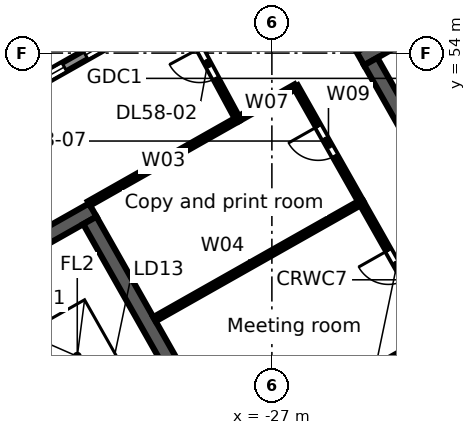
"""IFC4 building model, lengths in metres.
Left out: names, types, materials, properties, quantities, classifications, styles, units other than length and angle.
Written with IfcOpenShell. Run it as: python <this file> out.ifc"""

import sys

from ifc_helpers import new_model, si_unit, direction, frame, frame_2d, origin, place, context, subcontext, project, spatial, rectangle, extrude, element, fill, save


model = new_model("IFC4")
c1 = context("Model", 3, precision=1e-05, world=origin(), true_north=direction((0.0, 1.0)))
c2 = subcontext(c1, "Body", "Model", "MODEL_VIEW")
j1 = project(units=[si_unit("LENGTHUNIT", "METRE"), si_unit("PLANEANGLEUNIT", "RADIAN")], contexts=[c1])
p1 = place(None, origin())
s1 = spatial("IfcSite", under=j1, at=p1, CompositionType="ELEMENT")
p2 = place(p1, origin())
s2 = spatial("IfcBuilding", under=s1, at=p2, CompositionType="ELEMENT")
p3 = place(p2, frame((0.0, 0.0, 262.7)))
s3 = spatial("IfcBuildingStorey", under=s2, at=p3, CompositionType="ELEMENT", Elevation=262.7)
p4 = place(p3, frame((-58.732, 38.771, 0.0), z_axis=(0.0, 0.0, 1.0), x_axis=(0.870355615581, 0.492423702137, 0.0)))
e1 = element("IfcWall", 1, at=p4, inside=s3, PredefinedType="STANDARD", context=c2, shape_type="SweptSolid", body=[
    extrude(rectangle(XDim=64.052, YDim=0.25, at=frame_2d((32.026, 0.0))), origin(), (0.0, 0.0, 1.0), 3.52),
])
p5 = place(p4, frame((61.259, 0.0, 0.8)))
e2 = element("IfcOpeningElement", 2, at=p5, cuts=e1, PredefinedType="OPENING", context=c2, shape_type="SweptSolid", body=[
    extrude(rectangle(XDim=2.4, YDim=2.2, at=frame_2d((1.2, 1.1))), frame((0.0, 0.135, 0.0), z_axis=(0.0, -1.0, 0.0), x_axis=(1.0, 0.0, 0.0)), (0.0, 0.0, 1.0), 0.27),
])
p6 = place(p4, frame((58.216, 0.0, 0.8)))
e3 = element("IfcOpeningElement", 3, at=p6, cuts=e1, PredefinedType="OPENING", context=c2, shape_type="SweptSolid", body=[
    extrude(rectangle(XDim=2.4, YDim=2.2, at=frame_2d((1.2, 1.1))), frame((0.0, 0.135, 0.0), z_axis=(0.0, -1.0, 0.0), x_axis=(1.0, 0.0, 0.0)), (0.0, 0.0, 1.0), 0.27),
])
p7 = place(p4, frame((55.173, 0.0, 0.8)))
e4 = element("IfcOpeningElement", 4, at=p7, cuts=e1, PredefinedType="OPENING", context=c2, shape_type="SweptSolid", body=[
    extrude(rectangle(XDim=2.4, YDim=2.2, at=frame_2d((1.2, 1.1))), frame((0.0, 0.135, 0.0), z_axis=(0.0, -1.0, 0.0), x_axis=(1.0, 0.0, 0.0)), (0.0, 0.0, 1.0), 0.27),
])
p8 = place(p4, frame((52.129, 0.0, 0.8)))
e5 = element("IfcOpeningElement", 5, at=p8, cuts=e1, PredefinedType="OPENING", context=c2, shape_type="SweptSolid", body=[
    extrude(rectangle(XDim=2.4, YDim=2.2, at=frame_2d((1.2, 1.1))), frame((0.0, 0.135, 0.0), z_axis=(0.0, -1.0, 0.0), x_axis=(1.0, 0.0, 0.0)), (0.0, 0.0, 1.0), 0.27),
])
p9 = place(p4, frame((49.086, 0.0, 0.8)))
e6 = element("IfcOpeningElement", 6, at=p9, cuts=e1, PredefinedType="OPENING", context=c2, shape_type="SweptSolid", body=[
    extrude(rectangle(XDim=2.4, YDim=2.2, at=frame_2d((1.2, 1.1))), frame((0.0, 0.135, 0.0), z_axis=(0.0, -1.0, 0.0), x_axis=(1.0, 0.0, 0.0)), (0.0, 0.0, 1.0), 0.27),
])
p10 = place(p4, frame((46.043, 0.0, 0.8)))
e7 = element("IfcOpeningElement", 7, at=p10, cuts=e1, PredefinedType="OPENING", context=c2, shape_type="SweptSolid", body=[
    extrude(rectangle(XDim=2.4, YDim=2.2, at=frame_2d((1.2, 1.1))), frame((0.0, 0.135, 0.0), z_axis=(0.0, -1.0, 0.0), x_axis=(1.0, 0.0, 0.0)), (0.0, 0.0, 1.0), 0.27),
])
p11 = place(p4, frame((43.0, 0.0, 0.8)))
e8 = element("IfcOpeningElement", 8, at=p11, cuts=e1, PredefinedType="OPENING", context=c2, shape_type="SweptSolid", body=[
    extrude(rectangle(XDim=2.4, YDim=2.2, at=frame_2d((1.2, 1.1))), frame((0.0, 0.135, 0.0), z_axis=(0.0, -1.0, 0.0), x_axis=(1.0, 0.0, 0.0)), (0.0, 0.0, 1.0), 0.27),
])
p12 = place(p4, frame((39.956, 0.0, 0.8)))
e9 = element("IfcOpeningElement", 9, at=p12, cuts=e1, PredefinedType="OPENING", context=c2, shape_type="SweptSolid", body=[
    extrude(rectangle(XDim=2.4, YDim=2.2, at=frame_2d((1.2, 1.1))), frame((0.0, 0.135, 0.0), z_axis=(0.0, -1.0, 0.0), x_axis=(1.0, 0.0, 0.0)), (0.0, 0.0, 1.0), 0.27),
])
p13 = place(p4, frame((36.913, 0.0, 0.8)))
e10 = element("IfcOpeningElement", 10, at=p13, cuts=e1, PredefinedType="OPENING", context=c2, shape_type="SweptSolid", body=[
    extrude(rectangle(XDim=2.4, YDim=2.2, at=frame_2d((1.2, 1.1))), frame((0.0, 0.135, 0.0), z_axis=(0.0, -1.0, 0.0), x_axis=(1.0, 0.0, 0.0)), (0.0, 0.0, 1.0), 0.27),
])
p14 = place(p4, frame((33.87, 0.0, 0.8)))
e11 = element("IfcOpeningElement", 11, at=p14, cuts=e1, PredefinedType="OPENING", context=c2, shape_type="SweptSolid", body=[
    extrude(rectangle(XDim=2.4, YDim=2.2, at=frame_2d((1.2, 1.1))), frame((0.0, 0.135, 0.0), z_axis=(0.0, -1.0, 0.0), x_axis=(1.0, 0.0, 0.0)), (0.0, 0.0, 1.0), 0.27),
])
p15 = place(p4, frame((30.826, 0.0, 0.8)))
e12 = element("IfcOpeningElement", 12, at=p15, cuts=e1, PredefinedType="OPENING", context=c2, shape_type="SweptSolid", body=[
    extrude(rectangle(XDim=2.4, YDim=2.2, at=frame_2d((1.2, 1.1))), frame((0.0, 0.135, 0.0), z_axis=(0.0, -1.0, 0.0), x_axis=(1.0, 0.0, 0.0)), (0.0, 0.0, 1.0), 0.27),
])
p16 = place(p4, frame((27.783, 0.0, 0.8)))
e13 = element("IfcOpeningElement", 13, at=p16, cuts=e1, PredefinedType="OPENING", context=c2, shape_type="SweptSolid", body=[
    extrude(rectangle(XDim=2.4, YDim=2.2, at=frame_2d((1.2, 1.1))), frame((0.0, 0.135, 0.0), z_axis=(0.0, -1.0, 0.0), x_axis=(1.0, 0.0, 0.0)), (0.0, 0.0, 1.0), 0.27),
])
p17 = place(p4, frame((24.74, 0.0, 0.8)))
e14 = element("IfcOpeningElement", 14, at=p17, cuts=e1, PredefinedType="OPENING", context=c2, shape_type="SweptSolid", body=[
    extrude(rectangle(XDim=2.4, YDim=2.2, at=frame_2d((1.2, 1.1))), frame((0.0, 0.135, 0.0), z_axis=(0.0, -1.0, 0.0), x_axis=(1.0, 0.0, 0.0)), (0.0, 0.0, 1.0), 0.27),
])
p18 = place(p4, frame((21.696, 0.0, 0.8)))
e15 = element("IfcOpeningElement", 15, at=p18, cuts=e1, PredefinedType="OPENING", context=c2, shape_type="SweptSolid", body=[
    extrude(rectangle(XDim=2.4, YDim=2.2, at=frame_2d((1.2, 1.1))), frame((0.0, 0.135, 0.0), z_axis=(0.0, -1.0, 0.0), x_axis=(1.0, 0.0, 0.0)), (0.0, 0.0, 1.0), 0.27),
])
p19 = place(p4, frame((18.653, 0.0, 0.8)))
e16 = element("IfcOpeningElement", 16, at=p19, cuts=e1, PredefinedType="OPENING", context=c2, shape_type="SweptSolid", body=[
    extrude(rectangle(XDim=2.4, YDim=2.2, at=frame_2d((1.2, 1.1))), frame((0.0, 0.135, 0.0), z_axis=(0.0, -1.0, 0.0), x_axis=(1.0, 0.0, 0.0)), (0.0, 0.0, 1.0), 0.27),
])
p20 = place(p4, frame((15.61, 0.0, 0.8)))
e17 = element("IfcOpeningElement", 17, at=p20, cuts=e1, PredefinedType="OPENING", context=c2, shape_type="SweptSolid", body=[
    extrude(rectangle(XDim=2.4, YDim=2.2, at=frame_2d((1.2, 1.1))), frame((0.0, 0.135, 0.0), z_axis=(0.0, -1.0, 0.0), x_axis=(1.0, 0.0, 0.0)), (0.0, 0.0, 1.0), 0.27),
])
p21 = place(p4, frame((12.567, 0.0, 0.8)))
e18 = element("IfcOpeningElement", 18, at=p21, cuts=e1, PredefinedType="OPENING", context=c2, shape_type="SweptSolid", body=[
    extrude(rectangle(XDim=2.4, YDim=2.2, at=frame_2d((1.2, 1.1))), frame((0.0, 0.135, 0.0), z_axis=(0.0, -1.0, 0.0), x_axis=(1.0, 0.0, 0.0)), (0.0, 0.0, 1.0), 0.27),
])
p22 = place(p4, frame((9.523, 0.0, 0.8)))
e19 = element("IfcOpeningElement", 19, at=p22, cuts=e1, PredefinedType="OPENING", context=c2, shape_type="SweptSolid", body=[
    extrude(rectangle(XDim=2.4, YDim=2.2, at=frame_2d((1.2, 1.1))), frame((0.0, 0.135, 0.0), z_axis=(0.0, -1.0, 0.0), x_axis=(1.0, 0.0, 0.0)), (0.0, 0.0, 1.0), 0.27),
])
p23 = place(p4, frame((6.48, 0.0, 0.8)))
e20 = element("IfcOpeningElement", 20, at=p23, cuts=e1, PredefinedType="OPENING", context=c2, shape_type="SweptSolid", body=[
    extrude(rectangle(XDim=2.4, YDim=2.2, at=frame_2d((1.2, 1.1))), frame((0.0, 0.135, 0.0), z_axis=(0.0, -1.0, 0.0), x_axis=(1.0, 0.0, 0.0)), (0.0, 0.0, 1.0), 0.27),
])
p24 = place(p4, frame((3.437, 0.0, 0.8)))
e21 = element("IfcOpeningElement", 21, at=p24, cuts=e1, PredefinedType="OPENING", context=c2, shape_type="SweptSolid", body=[
    extrude(rectangle(XDim=2.4, YDim=2.2, at=frame_2d((1.2, 1.1))), frame((0.0, 0.135, 0.0), z_axis=(0.0, -1.0, 0.0), x_axis=(1.0, 0.0, 0.0)), (0.0, 0.0, 1.0), 0.27),
])
p25 = place(p4, frame((0.393, 0.0, 0.8)))
e22 = element("IfcOpeningElement", 22, at=p25, cuts=e1, PredefinedType="OPENING", context=c2, shape_type="SweptSolid", body=[
    extrude(rectangle(XDim=2.4, YDim=2.2, at=frame_2d((1.2, 1.1))), frame((0.0, 0.135, 0.0), z_axis=(0.0, -1.0, 0.0), x_axis=(1.0, 0.0, 0.0)), (0.0, 0.0, 1.0), 0.27),
])
p26 = place(p3, frame((-3.017, 46.293, 0.0), z_axis=(0.0, 0.0, 1.0), x_axis=(-0.870355474887, -0.492423950812, 0.0)))
e23 = element("IfcWall", 23, at=p26, inside=s3, PredefinedType="STANDARD", context=c2, shape_type="SweptSolid", body=[
    extrude(rectangle(XDim=40.34, YDim=0.25, at=frame_2d((20.17, 0.0))), origin(), (0.0, 0.0, 1.0), 3.52),
])
p27 = place(p26, frame((37.428, 0.0, 0.8)))
e24 = element("IfcOpeningElement", 24, at=p27, cuts=e23, PredefinedType="OPENING", context=c2, shape_type="SweptSolid", body=[
    extrude(rectangle(XDim=2.4, YDim=2.2, at=frame_2d((1.2, 1.1))), frame((0.0, 0.135, 0.0), z_axis=(0.0, -1.0, 0.0), x_axis=(1.0, 0.0, 0.0)), (0.0, 0.0, 1.0), 0.27),
])
p28 = place(p26, frame((34.372, 0.0, 0.0)))
e25 = element("IfcOpeningElement", 25, at=p28, cuts=e23, PredefinedType="OPENING", context=c2, shape_type="SweptSolid", body=[
    extrude(rectangle(XDim=1.8, YDim=2.4, at=frame_2d((0.9, 1.2))), frame((0.0, 0.135, 0.0), z_axis=(0.0, -1.0, 0.0), x_axis=(1.0, 0.0, 0.0)), (0.0, 0.0, 1.0), 0.27),
])
p29 = place(p26, frame((30.716, 0.0, 0.8)))
e26 = element("IfcOpeningElement", 26, at=p29, cuts=e23, PredefinedType="OPENING", context=c2, shape_type="SweptSolid", body=[
    extrude(rectangle(XDim=2.4, YDim=2.2, at=frame_2d((1.2, 1.1))), frame((0.0, 0.135, 0.0), z_axis=(0.0, -1.0, 0.0), x_axis=(1.0, 0.0, 0.0)), (0.0, 0.0, 1.0), 0.27),
])
p30 = place(p26, frame((27.36, 0.0, 0.8)))
e27 = element("IfcOpeningElement", 27, at=p30, cuts=e23, PredefinedType="OPENING", context=c2, shape_type="SweptSolid", body=[
    extrude(rectangle(XDim=2.4, YDim=2.2, at=frame_2d((1.2, 1.1))), frame((0.0, 0.135, 0.0), z_axis=(0.0, -1.0, 0.0), x_axis=(1.0, 0.0, 0.0)), (0.0, 0.0, 1.0), 0.27),
])
p31 = place(p26, frame((24.304, 0.0, 0.0)))
e28 = element("IfcOpeningElement", 28, at=p31, cuts=e23, PredefinedType="OPENING", context=c2, shape_type="SweptSolid", body=[
    extrude(rectangle(XDim=1.8, YDim=2.4, at=frame_2d((0.9, 1.2))), frame((0.0, 0.135, 0.0), z_axis=(0.0, -1.0, 0.0), x_axis=(1.0, 0.0, 0.0)), (0.0, 0.0, 1.0), 0.27),
])
p32 = place(p26, frame((20.648, 0.0, 0.8)))
e29 = element("IfcOpeningElement", 29, at=p32, cuts=e23, PredefinedType="OPENING", context=c2, shape_type="SweptSolid", body=[
    extrude(rectangle(XDim=2.4, YDim=2.2, at=frame_2d((1.2, 1.1))), frame((0.0, 0.135, 0.0), z_axis=(0.0, -1.0, 0.0), x_axis=(1.0, 0.0, 0.0)), (0.0, 0.0, 1.0), 0.27),
])
p33 = place(p26, frame((17.292, 0.0, 0.8)))
e30 = element("IfcOpeningElement", 30, at=p33, cuts=e23, PredefinedType="OPENING", context=c2, shape_type="SweptSolid", body=[
    extrude(rectangle(XDim=2.4, YDim=2.2, at=frame_2d((1.2, 1.1))), frame((0.0, 0.135, 0.0), z_axis=(0.0, -1.0, 0.0), x_axis=(1.0, 0.0, 0.0)), (0.0, 0.0, 1.0), 0.27),
])
p34 = place(p26, frame((14.236, 0.0, 0.0)))
e31 = element("IfcOpeningElement", 31, at=p34, cuts=e23, PredefinedType="OPENING", context=c2, shape_type="SweptSolid", body=[
    extrude(rectangle(XDim=1.8, YDim=2.4, at=frame_2d((0.9, 1.2))), frame((0.0, 0.135, 0.0), z_axis=(0.0, -1.0, 0.0), x_axis=(1.0, 0.0, 0.0)), (0.0, 0.0, 1.0), 0.27),
])
p35 = place(p26, frame((10.58, 0.0, 0.8)))
e32 = element("IfcOpeningElement", 32, at=p35, cuts=e23, PredefinedType="OPENING", context=c2, shape_type="SweptSolid", body=[
    extrude(rectangle(XDim=2.4, YDim=2.2, at=frame_2d((1.2, 1.1))), frame((0.0, 0.135, 0.0), z_axis=(0.0, -1.0, 0.0), x_axis=(1.0, 0.0, 0.0)), (0.0, 0.0, 1.0), 0.27),
])
p36 = place(p26, frame((7.224, 0.0, 0.8)))
e33 = element("IfcOpeningElement", 33, at=p36, cuts=e23, PredefinedType="OPENING", context=c2, shape_type="SweptSolid", body=[
    extrude(rectangle(XDim=2.4, YDim=2.2, at=frame_2d((1.2, 1.1))), frame((0.0, 0.135, 0.0), z_axis=(0.0, -1.0, 0.0), x_axis=(1.0, 0.0, 0.0)), (0.0, 0.0, 1.0), 0.27),
])
p37 = place(p26, frame((4.168, 0.0, 0.0)))
e34 = element("IfcOpeningElement", 34, at=p37, cuts=e23, PredefinedType="OPENING", context=c2, shape_type="SweptSolid", body=[
    extrude(rectangle(XDim=1.8, YDim=2.4, at=frame_2d((0.9, 1.2))), frame((0.0, 0.135, 0.0), z_axis=(0.0, -1.0, 0.0), x_axis=(1.0, 0.0, 0.0)), (0.0, 0.0, 1.0), 0.27),
])
p38 = place(p26, frame((0.512, 0.0, 0.8)))
e35 = element("IfcOpeningElement", 35, at=p38, cuts=e23, PredefinedType="OPENING", context=c2, shape_type="SweptSolid", body=[
    extrude(rectangle(XDim=2.4, YDim=2.2, at=frame_2d((1.2, 1.1))), frame((0.0, 0.135, 0.0), z_axis=(0.0, -1.0, 0.0), x_axis=(1.0, 0.0, 0.0)), (0.0, 0.0, 1.0), 0.27),
])
p39 = place(p3, frame((-46.51, 41.499, 0.0), z_axis=(0.0, 0.0, 1.0), x_axis=(0.870356271124, 0.492422543467, 0.0)))
e36 = element("IfcWall", 36, at=p39, inside=s3, PredefinedType="SOLIDWALL", context=c2, shape_type="SweptSolid", body=[
    extrude(rectangle(XDim=17.0, YDim=0.4, at=frame_2d((8.5, 0.0))), origin(), (0.0, 0.0, 1.0), 3.52),
])
p40 = place(p3, frame((-31.79, 49.597, 0.0), z_axis=(0.0, 0.0, 1.0), x_axis=(0.492421663121, -0.870356769198, 0.0)))
e37 = element("IfcWall", 37, at=p40, inside=s3, PredefinedType="SOLIDWALL", context=c2, shape_type="SweptSolid", body=[
    extrude(rectangle(XDim=13.2, YDim=0.4, at=frame_2d((6.6, 0.0))), origin(), (0.0, 0.0, 1.0), 3.52),
])
p41 = place(p3, frame((-24.672, 53.854, 0.0), z_axis=(0.0, 0.0, 1.0), x_axis=(0.870353598469, 0.492427267353, 0.0)))
e38 = element("IfcWall", 38, at=p41, inside=s3, PredefinedType="SOLIDWALL", context=c2, shape_type="SweptSolid", body=[
    extrude(rectangle(XDim=15.0, YDim=0.4, at=frame_2d((7.5, 0.0))), origin(), (0.0, 0.0, 1.0), 3.52),
])
p42 = place(p3, frame((-24.4, 53.779, 0.0), z_axis=(0.0, 0.0, 1.0), x_axis=(0.492421663121, -0.870356769198, 0.0)))
e39 = element("IfcWall", 39, at=p42, inside=s3, PredefinedType="SOLIDWALL", context=c2, shape_type="SweptSolid", body=[
    extrude(rectangle(XDim=13.2, YDim=0.4, at=frame_2d((6.6, 0.0))), origin(), (0.0, 0.0, 1.0), 3.52),
])
p43 = place(p3, frame((-31.812, 50.044, 0.0), z_axis=(0.0, 0.0, 1.0), x_axis=(0.870309075431, 0.492505952474, 0.0)))
e40 = element("IfcWall", 40, at=p43, inside=s3, PredefinedType="PARTITIONING", context=c2, shape_type="SweptSolid", body=[
    extrude(rectangle(XDim=4.5, YDim=0.125, at=frame_2d((2.25, 0.0))), origin(), (0.0, 0.0, 1.0), 3.52),
])
p44 = place(p3, frame((-30.089, 46.998, 0.0), z_axis=(0.0, 0.0, 1.0), x_axis=(0.870424575418, 0.492301796167, 0.0)))
e41 = element("IfcWall", 41, at=p44, inside=s3, PredefinedType="PARTITIONING", context=c2, shape_type="SweptSolid", body=[
    extrude(rectangle(XDim=6.25, YDim=0.125, at=frame_2d((3.125, 0.0))), origin(), (0.0, 0.0, 1.0), 3.52),
])
p45 = place(p3, frame((-29.474, 55.181, 0.0), z_axis=(0.0, 0.0, 1.0), x_axis=(0.475344759365, -0.879799613403, 0.0)))
e42 = element("IfcWall", 42, at=p45, inside=s3, PredefinedType="PARTITIONING", context=c2, shape_type="SweptSolid", body=[
    extrude(rectangle(XDim=3.32, YDim=0.125, at=frame_2d((1.66, 0.0))), origin(), (0.0, 0.0, 1.0), 2.888),
])
p46 = place(p45, frame((1.2, 0.0, 0.0)))
e43 = element("IfcOpeningElement", 43, at=p46, cuts=e42, PredefinedType="OPENING", context=c2, shape_type="SweptSolid", body=[
    extrude(rectangle(XDim=0.9, YDim=2.1, at=frame_2d((0.45, 1.05))), frame((0.0, 0.073, 0.0), z_axis=(0.0, -1.0, 0.0), x_axis=(1.0, 0.0, 0.0)), (0.0, 0.0, 1.0), 0.145),
])
p47 = place(p3, frame((-28.119, 43.516, 0.0), z_axis=(0.0, 0.0, 1.0), x_axis=(0.870310250913, 0.49250387527, 0.0)))
e44 = element("IfcWall", 44, at=p47, inside=s3, PredefinedType="PARTITIONING", context=c2, shape_type="SweptSolid", body=[
    extrude(rectangle(XDim=6.25, YDim=0.15, at=frame_2d((3.125, 0.0))), origin(), (0.0, 0.0, 1.0), 2.792),
])
p48 = place(p3, frame((-27.896, 52.26, 0.0), z_axis=(0.0, 0.0, 1.0), x_axis=(0.870253469837, 0.492604200384, 0.0)))
e45 = element("IfcWall", 45, at=p48, inside=s3, PredefinedType="PARTITIONING", context=c2, shape_type="SweptSolid", body=[
    extrude(rectangle(XDim=1.75, YDim=0.125, at=frame_2d((0.875, 0.0))), origin(), (0.0, 0.0, 1.0), 3.52),
])
p49 = place(p3, frame((-26.373, 53.122, 0.0), z_axis=(0.0, 0.0, 1.0), x_axis=(0.492454723656, -0.870338063714, 0.0)))
e46 = element("IfcWall", 46, at=p49, inside=s3, PredefinedType="PARTITIONING", context=c2, shape_type="SweptSolid", body=[
    extrude(rectangle(XDim=3.501, YDim=0.125, at=frame_2d((1.75, 0.0))), origin(), (0.0, 0.0, 1.0), 3.52),
])
p50 = place(p49, frame((1.2, 0.0, 0.0)))
e47 = element("IfcOpeningElement", 47, at=p50, cuts=e46, PredefinedType="OPENING", context=c2, shape_type="SweptSolid", body=[
    extrude(rectangle(XDim=0.9, YDim=2.1, at=frame_2d((0.45, 1.05))), frame((0.0, 0.073, 0.0), z_axis=(0.0, -1.0, 0.0), x_axis=(1.0, 0.0, 0.0)), (0.0, 0.0, 1.0), 0.145),
])
p51 = place(p3, frame((-24.649, 50.075, 0.0), z_axis=(0.0, 0.0, 1.0), x_axis=(0.492340861121, -0.870402479587, 0.0)))
e48 = element("IfcWall", 48, at=p51, inside=s3, PredefinedType="PARTITIONING", context=c2, shape_type="SweptSolid", body=[
    extrude(rectangle(XDim=3.999, YDim=0.125, at=frame_2d((2.0, 0.0))), origin(), (0.0, 0.0, 1.0), 2.792),
])
p52 = place(p51, frame((1.45, 0.0, 0.0)))
e49 = element("IfcOpeningElement", 49, at=p52, cuts=e48, PredefinedType="OPENING", context=c2, shape_type="SweptSolid", body=[
    extrude(rectangle(XDim=0.9, YDim=2.1, at=frame_2d((0.45, 1.05))), frame((0.0, 0.073, 0.0), z_axis=(0.0, -1.0, 0.0), x_axis=(1.0, 0.0, 0.0)), (0.0, 0.0, 1.0), 0.145),
])
p53 = place(p15, origin())
e50 = element("IfcWindow", 50, at=p53, inside=s3, PartitioningType="SINGLE_PANEL", PredefinedType="WINDOW", context=c2, shape_type="SweptSolid", body=[
    extrude(rectangle(XDim=2.4, YDim=2.2, at=frame_2d((1.2, 1.1))), frame((0.0, 0.03, 0.0), z_axis=(0.0, -1.0, 0.0), x_axis=(1.0, 0.0, 0.0)), (0.0, 0.0, 1.0), 0.06),
])
fill(e12, e50)
p54 = place(p16, origin())
e51 = element("IfcWindow", 51, at=p54, inside=s3, PartitioningType="SINGLE_PANEL", PredefinedType="WINDOW", context=c2, shape_type="SweptSolid", body=[
    extrude(rectangle(XDim=2.4, YDim=2.2, at=frame_2d((1.2, 1.1))), frame((0.0, 0.03, 0.0), z_axis=(0.0, -1.0, 0.0), x_axis=(1.0, 0.0, 0.0)), (0.0, 0.0, 1.0), 0.06),
])
fill(e13, e51)
p55 = place(p46, frame((0.9, 0.0, 0.0), z_axis=(0.0, 0.0, 1.0), x_axis=(-1.0, 0.0, 0.0)))
e52 = element("IfcDoor", 52, at=p55, inside=s3, OperationType="SINGLE_SWING_RIGHT", PredefinedType="DOOR", context=c2, shape_type="SweptSolid", body=[
    extrude(rectangle(XDim=0.9, YDim=2.1, at=frame_2d((0.45, 1.05))), frame((0.0, 0.025, 0.0), z_axis=(0.0, -1.0, 0.0), x_axis=(1.0, 0.0, 0.0)), (0.0, 0.0, 1.0), 0.05),
])
fill(e43, e52)
p56 = place(p52, frame((0.9, 0.0, 0.0), z_axis=(0.0, 0.0, 1.0), x_axis=(-1.0, 0.0, 0.0)))
e53 = element("IfcDoor", 53, at=p56, inside=s3, OperationType="SINGLE_SWING_RIGHT", PredefinedType="DOOR", context=c2, shape_type="SweptSolid", body=[
    extrude(rectangle(XDim=0.9, YDim=2.1, at=frame_2d((0.45, 1.05))), frame((0.0, 0.025, 0.0), z_axis=(0.0, -1.0, 0.0), x_axis=(1.0, 0.0, 0.0)), (0.0, 0.0, 1.0), 0.05),
])
fill(e49, e53)
p57 = place(p50, frame((0.9, 0.0, 0.0), z_axis=(0.0, 0.0, 1.0), x_axis=(-1.0, 0.0, 0.0)))
e54 = element("IfcDoor", 54, at=p57, inside=s3, OperationType="SINGLE_SWING_RIGHT", PredefinedType="DOOR", context=c2, shape_type="SweptSolid", body=[
    extrude(rectangle(XDim=0.9, YDim=2.1, at=frame_2d((0.45, 1.05))), frame((0.0, 0.025, 0.0), z_axis=(0.0, -1.0, 0.0), x_axis=(1.0, 0.0, 0.0)), (0.0, 0.0, 1.0), 0.05),
])
fill(e47, e54)
save(model, sys.argv[1])
